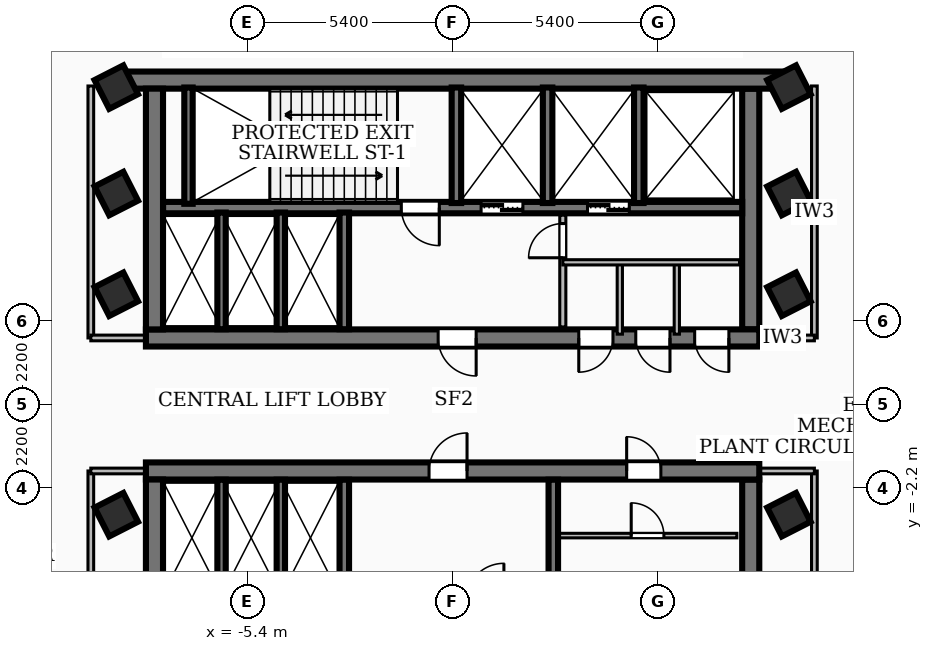
"""IFC4 building model, lengths in metres.
Left out: names, types, materials, properties, quantities, classifications, styles, units other than length and angle.
Written with IfcOpenShell. Run it as: python <this file> out.ifc"""

import sys

from ifc_helpers import new_model, si_unit, direction, frame, frame_2d, origin, origin_2d, place, context, subcontext, project, spatial, rectangle, extrude, element, fill, save


model = new_model("IFC4")
c1 = context("Model", 3, precision=1e-05, world=origin(), true_north=direction((0.0, 1.0)))
c2 = subcontext(c1, "Body", "Model", "MODEL_VIEW")
j1 = project(units=[si_unit("LENGTHUNIT", "METRE"), si_unit("PLANEANGLEUNIT", "RADIAN")], contexts=[c1])
p1 = place(None, origin())
s1 = spatial("IfcSite", under=j1, at=p1, CompositionType="ELEMENT")
p2 = place(p1, origin())
s2 = spatial("IfcBuilding", under=s1, at=p2, CompositionType="ELEMENT")
p3 = place(p2, frame((0.0, 0.0, 196.2)))
s3 = spatial("IfcBuildingStorey", under=s2, at=p3, CompositionType="ELEMENT", Elevation=196.2)
p4 = place(p3, frame((-8.78, 8.535, 0.0), z_axis=(0.0, 0.0, 1.0), x_axis=(1.0, 0.0, 0.0)))
e1 = element("IfcWall", 1, at=p4, inside=s3, PredefinedType="SHEAR", context=c2, shape_type="SweptSolid", body=[
    extrude(rectangle(XDim=17.56, YDim=0.45, at=frame_2d((8.78, 0.0))), origin(), (0.0, 0.0, 1.0), 4.42),
])
p5 = place(p3, frame((8.07, 1.75, 0.0), z_axis=(0.0, 0.0, 1.0), x_axis=(-1.0, 0.0, 0.0)))
e2 = element("IfcWall", 2, at=p5, inside=s3, PredefinedType="SHEAR", context=c2, shape_type="SweptSolid", body=[
    extrude(rectangle(XDim=16.14, YDim=0.45, at=frame_2d((8.07, 0.0))), origin(), (0.0, 0.0, 1.0), 4.42),
])
p6 = place(p5, frame((7.45, 0.0, 0.0)))
e3 = element("IfcOpeningElement", 3, at=p6, cuts=e2, PredefinedType="OPENING", context=c2, shape_type="SweptSolid", body=[
    extrude(rectangle(XDim=1.0, YDim=2.1, at=frame_2d((0.5, 1.05))), frame((0.0, 0.235, 0.0), z_axis=(0.0, -1.0, 0.0), x_axis=(1.0, 0.0, 0.0)), (0.0, 0.0, 1.0), 0.47),
])
p7 = place(p5, frame((3.85, 0.0, 0.0)))
e4 = element("IfcOpeningElement", 4, at=p7, cuts=e2, PredefinedType="OPENING", context=c2, shape_type="SweptSolid", body=[
    extrude(rectangle(XDim=0.9, YDim=2.06, at=frame_2d((0.45, 1.03))), frame((0.0, 0.235, 0.0), z_axis=(0.0, -1.0, 0.0), x_axis=(1.0, 0.0, 0.0)), (0.0, 0.0, 1.0), 0.47),
])
p8 = place(p5, frame((2.35, 0.0, 0.0)))
e5 = element("IfcOpeningElement", 5, at=p8, cuts=e2, PredefinedType="OPENING", context=c2, shape_type="SweptSolid", body=[
    extrude(rectangle(XDim=0.9, YDim=2.06, at=frame_2d((0.45, 1.03))), frame((0.0, 0.235, 0.0), z_axis=(0.0, -1.0, 0.0), x_axis=(1.0, 0.0, 0.0)), (0.0, 0.0, 1.0), 0.47),
])
p9 = place(p5, frame((0.8, 0.0, 0.0)))
e6 = element("IfcOpeningElement", 6, at=p9, cuts=e2, PredefinedType="OPENING", context=c2, shape_type="SweptSolid", body=[
    extrude(rectangle(XDim=0.9, YDim=2.06, at=frame_2d((0.45, 1.03))), frame((0.0, 0.235, 0.0), z_axis=(0.0, -1.0, 0.0), x_axis=(1.0, 0.0, 0.0)), (0.0, 0.0, 1.0), 0.47),
])
for number, where, z_axis, x_axis in (
    (7, (-7.845, 1.975, 0.0), (0.0, 0.0, 1.0), (0.0, 1.0, 0.0)),
    (8, (7.845, 8.31, 0.0), (0.0, 0.0, 1.0), (0.0, -1.0, 0.0)),
):
    element("IfcWall", number, at=place(p3, frame(where, z_axis=z_axis, x_axis=x_axis)), inside=s3, PredefinedType="SHEAR", context=c2, shape_type="SweptSolid", body=[
        extrude(rectangle(XDim=6.335, YDim=0.45, at=frame_2d((3.167, 0.0))), origin(), (0.0, 0.0, 1.0), 4.42),
    ])
p10 = place(p3, frame((7.62, 5.18, 0.0), z_axis=(0.0, 0.0, 1.0), x_axis=(-1.0, 0.0, 0.0)))
e9 = element("IfcWall", 9, at=p10, inside=s3, PredefinedType="SOLIDWALL", context=c2, shape_type="SweptSolid", body=[
    extrude(rectangle(XDim=15.24, YDim=0.3, at=frame_2d((7.62, 0.0))), origin(), (0.0, 0.0, 1.0), 4.42),
])
p11 = place(p10, frame((5.77, 0.0, 0.0)))
e10 = element("IfcOpeningElement", 10, at=p11, cuts=e9, PredefinedType="OPENING", context=c2, shape_type="SweptSolid", body=[
    extrude(rectangle(XDim=1.1, YDim=2.15, at=frame_2d((0.55, 1.075))), frame((0.0, 0.16, 0.0), z_axis=(0.0, -1.0, 0.0), x_axis=(1.0, 0.0, 0.0)), (0.0, 0.0, 1.0), 0.32),
])
p12 = place(p10, frame((2.97, 0.0, 0.0)))
e11 = element("IfcOpeningElement", 11, at=p12, cuts=e9, PredefinedType="OPENING", context=c2, shape_type="SweptSolid", body=[
    extrude(rectangle(XDim=1.1, YDim=2.15, at=frame_2d((0.55, 1.075))), frame((0.0, 0.16, 0.0), z_axis=(0.0, -1.0, 0.0), x_axis=(1.0, 0.0, 0.0)), (0.0, 0.0, 1.0), 0.32),
])
p13 = place(p10, frame((7.97, 0.0, 0.0)))
e12 = element("IfcOpeningElement", 12, at=p13, cuts=e9, PredefinedType="OPENING", context=c2, shape_type="SweptSolid", body=[
    extrude(rectangle(XDim=1.0, YDim=2.1, at=frame_2d((0.5, 1.05))), frame((0.0, 0.16, 0.0), z_axis=(0.0, -1.0, 0.0), x_axis=(1.0, 0.0, 0.0)), (0.0, 0.0, 1.0), 0.32),
])
p14 = place(p3, frame((-8.07, -1.75, 0.0), z_axis=(0.0, 0.0, 1.0), x_axis=(1.0, 0.0, 0.0)))
e13 = element("IfcWall", 13, at=p14, inside=s3, PredefinedType="SHEAR", context=c2, shape_type="SweptSolid", body=[
    extrude(rectangle(XDim=16.14, YDim=0.45, at=frame_2d((8.07, 0.0))), origin(), (0.0, 0.0, 1.0), 4.42),
])
p15 = place(p14, frame((7.45, 0.0, 0.0)))
e14 = element("IfcOpeningElement", 14, at=p15, cuts=e13, PredefinedType="OPENING", context=c2, shape_type="SweptSolid", body=[
    extrude(rectangle(XDim=1.0, YDim=2.1, at=frame_2d((0.5, 1.05))), frame((0.0, 0.235, 0.0), z_axis=(0.0, -1.0, 0.0), x_axis=(1.0, 0.0, 0.0)), (0.0, 0.0, 1.0), 0.47),
])
p16 = place(p14, frame((12.65, 0.0, 0.0)))
e15 = element("IfcOpeningElement", 15, at=p16, cuts=e13, PredefinedType="OPENING", context=c2, shape_type="SweptSolid", body=[
    extrude(rectangle(XDim=0.9, YDim=2.06, at=frame_2d((0.45, 1.03))), frame((0.0, 0.235, 0.0), z_axis=(0.0, -1.0, 0.0), x_axis=(1.0, 0.0, 0.0)), (0.0, 0.0, 1.0), 0.47),
])
for number, where, z_axis, x_axis in (
    (16, (-7.845, -8.31, 0.0), (0.0, 0.0, 1.0), (0.0, 1.0, 0.0)),
    (17, (7.845, -1.975, 0.0), (0.0, 0.0, 1.0), (0.0, -1.0, 0.0)),
):
    element("IfcWall", number, at=place(p3, frame(where, z_axis=z_axis, x_axis=x_axis)), inside=s3, PredefinedType="SHEAR", context=c2, shape_type="SweptSolid", body=[
        extrude(rectangle(XDim=6.335, YDim=0.45, at=frame_2d((3.167, 0.0))), origin(), (0.0, 0.0, 1.0), 4.42),
    ])
p17 = place(p3, frame((-6.95, 5.28, 0.0), z_axis=(0.0, 0.0, 1.0), x_axis=(0.0, 1.0, 0.0)))
e18 = element("IfcWall", 18, at=p17, inside=s3, PredefinedType="SOLIDWALL", context=c2, shape_type="SweptSolid", body=[
    extrude(rectangle(XDim=3.06, YDim=0.22, at=frame_2d((1.53, 0.0))), origin(), (0.0, 0.0, 1.0), 4.42),
])
for number, where, z_axis, x_axis in (
    (19, (0.1, 5.3, 0.0), (0.0, 0.0, 1.0), (0.0, 1.0, 0.0)),
    (20, (2.5, 5.3, 0.0), (0.0, 0.0, 1.0), (0.0, 1.0, 0.0)),
    (21, (4.9, 5.3, 0.0), (0.0, 0.0, 1.0), (0.0, 1.0, 0.0)),
):
    element("IfcWall", number, at=place(p3, frame(where, z_axis=z_axis, x_axis=x_axis)), inside=s3, PredefinedType="SOLIDWALL", context=c2, shape_type="SweptSolid", body=[
        extrude(rectangle(XDim=3.04, YDim=0.25, at=frame_2d((1.52, 0.0))), origin(), (0.0, 0.0, 1.0), 4.42),
    ])
for number, where, z_axis, x_axis in (
    (22, (-2.85, 1.98, 0.0), (0.0, 0.0, 1.0), (0.0, 1.0, 0.0)),
    (23, (-2.85, -5.05, 0.0), (0.0, 0.0, 1.0), (0.0, 1.0, 0.0)),
    (24, (2.65, -5.05, 0.0), (0.0, 0.0, 1.0), (0.0, 1.0, 0.0)),
):
    element("IfcWall", number, at=place(p3, frame(where, z_axis=z_axis, x_axis=x_axis)), inside=s3, PredefinedType="SOLIDWALL", context=c2, shape_type="SweptSolid", body=[
        extrude(rectangle(XDim=3.07, YDim=0.25, at=frame_2d((1.535, 0.0))), origin(), (0.0, 0.0, 1.0), 4.42),
    ])
for number, where, z_axis, x_axis in (
    (25, (-6.08, 1.98, 0.0), (0.0, 0.0, 1.0), (0.0, 1.0, 0.0)),
    (26, (-4.52, 1.98, 0.0), (0.0, 0.0, 1.0), (0.0, 1.0, 0.0)),
    (27, (-6.08, -5.05, 0.0), (0.0, 0.0, 1.0), (0.0, 1.0, 0.0)),
    (28, (-4.52, -5.05, 0.0), (0.0, 0.0, 1.0), (0.0, 1.0, 0.0)),
):
    element("IfcWall", number, at=place(p3, frame(where, z_axis=z_axis, x_axis=x_axis)), inside=s3, PredefinedType="SOLIDWALL", context=c2, shape_type="SweptSolid", body=[
        extrude(rectangle(XDim=3.07, YDim=0.22, at=frame_2d((1.535, 0.0))), origin(), (0.0, 0.0, 1.0), 4.42),
    ])
for number, where, z_axis, x_axis in (
    (29, (-8.85, -2.9, 0.0), (0.0, 0.0, 1.0), (0.891, 0.454, 0.0)),
    (30, (-8.85, 2.9, 0.0), (0.0, 0.0, 1.0), (0.891, 0.454, 0.0)),
    (31, (-8.85, 5.55, 0.0), (0.0, 0.0, 1.0), (0.891, 0.454, 0.0)),
    (32, (8.85, -2.9, 0.0), (0.0, 0.0, 1.0), (0.891, 0.454, 0.0)),
    (33, (8.85, 2.9, 0.0), (0.0, 0.0, 1.0), (0.891, 0.454, 0.0)),
    (34, (8.85, 5.55, 0.0), (0.0, 0.0, 1.0), (0.891, 0.454, 0.0)),
    (35, (-8.85, 8.35, 0.0), (0.0, 0.0, 1.0), (0.891, 0.454, 0.0)),
    (36, (8.85, 8.35, 0.0), (0.0, 0.0, 1.0), (0.891, 0.454, 0.0)),
):
    element("IfcColumn", number, at=place(p3, frame(where, z_axis=z_axis, x_axis=x_axis)), inside=s3, PredefinedType="COLUMN", context=c2, shape_type="SweptSolid", body=[
        extrude(rectangle(XDim=0.85, YDim=0.85, at=origin_2d()), origin(), (0.0, 0.0, 1.0), 4.68),
    ])
p18 = place(p3, frame((2.9, 2.04, 0.0), z_axis=(0.0, 0.0, 1.0), x_axis=(0.0, 1.0, 0.0)))
e37 = element("IfcWall", 37, at=p18, inside=s3, PredefinedType="PARTITIONING", context=c2, shape_type="SweptSolid", body=[
    extrude(rectangle(XDim=2.94, YDim=0.16, at=frame_2d((1.47, 0.0))), origin(), (0.0, 0.0, 1.0), 3.65),
])
p19 = place(p18, frame((1.82, 0.0, 0.0)))
e38 = element("IfcOpeningElement", 38, at=p19, cuts=e37, PredefinedType="OPENING", context=c2, shape_type="SweptSolid", body=[
    extrude(rectangle(XDim=0.9, YDim=2.06, at=frame_2d((0.45, 1.03))), frame((0.0, 0.09, 0.0), z_axis=(0.0, -1.0, 0.0), x_axis=(1.0, 0.0, 0.0)), (0.0, 0.0, 1.0), 0.18),
])
p20 = place(p3, frame((2.9, 3.74, 0.0), z_axis=(0.0, 0.0, 1.0), x_axis=(1.0, 0.0, 0.0)))
e39 = element("IfcWall", 39, at=p20, inside=s3, PredefinedType="PARTITIONING", context=c2, shape_type="SweptSolid", body=[
    extrude(rectangle(XDim=4.65, YDim=0.138, at=frame_2d((2.325, 0.0))), origin(), (0.0, 0.0, 1.0), 4.42),
])
p21 = place(p3, frame((2.8, -3.45, 0.0), z_axis=(0.0, 0.0, 1.0), x_axis=(1.0, 0.0, 0.0)))
e40 = element("IfcWall", 40, at=p21, inside=s3, PredefinedType="PARTITIONING", context=c2, shape_type="SweptSolid", body=[
    extrude(rectangle(XDim=4.68, YDim=0.12, at=frame_2d((2.34, 0.0))), origin(), (0.0, 0.0, 1.0), 4.42),
])
p22 = place(p21, frame((1.9, 0.0, 0.0)))
e41 = element("IfcOpeningElement", 41, at=p22, cuts=e40, PredefinedType="OPENING", context=c2, shape_type="SweptSolid", body=[
    extrude(rectangle(XDim=0.86, YDim=2.04, at=frame_2d((0.43, 1.02))), frame((0.0, 0.07, 0.0), z_axis=(0.0, -1.0, 0.0), x_axis=(1.0, 0.0, 0.0)), (0.0, 0.0, 1.0), 0.14),
])
for number, where, z_axis, x_axis in (
    (42, (4.4, 1.85, 0.0), (0.0, 0.0, 1.0), (0.0, 1.0, 0.0)),
    (43, (5.9, 1.85, 0.0), (0.0, 0.0, 1.0), (0.0, 1.0, 0.0)),
):
    element("IfcWall", number, at=place(p3, frame(where, z_axis=z_axis, x_axis=x_axis)), inside=s3, PredefinedType="PARTITIONING", context=c2, shape_type="SweptSolid", body=[
        extrude(rectangle(XDim=1.89, YDim=0.138, at=frame_2d((0.945, 0.0))), origin(), (0.0, 0.0, 1.0), 3.65),
    ])
p23 = place(p3, frame((-9.52, 1.75, 0.0), z_axis=(0.0, 0.0, 1.0), x_axis=(0.0, 1.0, 0.0)))
e44 = element("IfcWall", 44, at=p23, inside=s3, PredefinedType="PARTITIONING", context=c2, shape_type="SweptSolid", body=[
    extrude(rectangle(XDim=6.63, YDim=0.15, at=frame_2d((3.315, 0.0))), origin(), (0.0, 0.0, 1.0), 4.42),
])
p24 = place(p3, frame((-7.85, 1.75, 0.0), z_axis=(0.0, 0.0, 1.0), x_axis=(-1.0, 0.0, 0.0)))
e45 = element("IfcWall", 45, at=p24, inside=s3, PredefinedType="PARTITIONING", context=c2, shape_type="SweptSolid", body=[
    extrude(rectangle(XDim=1.67, YDim=0.15, at=frame_2d((0.835, 0.0))), origin(), (0.0, 0.0, 1.0), 3.65),
])
p25 = place(p3, frame((-9.52, -8.38, 0.0), z_axis=(0.0, 0.0, 1.0), x_axis=(0.0, 1.0, 0.0)))
e46 = element("IfcWall", 46, at=p25, inside=s3, PredefinedType="PARTITIONING", context=c2, shape_type="SweptSolid", body=[
    extrude(rectangle(XDim=6.63, YDim=0.15, at=frame_2d((3.315, 0.0))), origin(), (0.0, 0.0, 1.0), 2.212),
])
p26 = place(p3, frame((-7.85, -1.75, 0.0), z_axis=(0.0, 0.0, 1.0), x_axis=(-1.0, 0.0, 0.0)))
e47 = element("IfcWall", 47, at=p26, inside=s3, PredefinedType="PARTITIONING", context=c2, shape_type="SweptSolid", body=[
    extrude(rectangle(XDim=1.67, YDim=0.15, at=frame_2d((0.835, 0.0))), origin(), (0.0, 0.0, 1.0), 3.65),
])
p27 = place(p3, frame((9.52, 1.75, 0.0), z_axis=(0.0, 0.0, 1.0), x_axis=(0.0, 1.0, 0.0)))
e48 = element("IfcWall", 48, at=p27, inside=s3, PredefinedType="PARTITIONING", context=c2, shape_type="SweptSolid", body=[
    extrude(rectangle(XDim=6.63, YDim=0.15, at=frame_2d((3.315, 0.0))), origin(), (0.0, 0.0, 1.0), 2.212),
])
p28 = place(p3, frame((7.85, 1.75, 0.0), z_axis=(0.0, 0.0, 1.0), x_axis=(1.0, 0.0, 0.0)))
e49 = element("IfcWall", 49, at=p28, inside=s3, PredefinedType="PARTITIONING", context=c2, shape_type="SweptSolid", body=[
    extrude(rectangle(XDim=1.67, YDim=0.15, at=frame_2d((0.835, 0.0))), origin(), (0.0, 0.0, 1.0), 3.65),
])
p29 = place(p3, frame((9.52, -8.38, 0.0), z_axis=(0.0, 0.0, 1.0), x_axis=(0.0, 1.0, 0.0)))
e50 = element("IfcWall", 50, at=p29, inside=s3, PredefinedType="PARTITIONING", context=c2, shape_type="SweptSolid", body=[
    extrude(rectangle(XDim=6.63, YDim=0.15, at=frame_2d((3.315, 0.0))), origin(), (0.0, 0.0, 1.0), 4.42),
])
p30 = place(p3, frame((7.85, -1.75, 0.0), z_axis=(0.0, 0.0, 1.0), x_axis=(1.0, 0.0, 0.0)))
e51 = element("IfcWall", 51, at=p30, inside=s3, PredefinedType="PARTITIONING", context=c2, shape_type="SweptSolid", body=[
    extrude(rectangle(XDim=1.67, YDim=0.15, at=frame_2d((0.835, 0.0))), origin(), (0.0, 0.0, 1.0), 3.65),
])
p31 = place(p3, frame((7.943, 15.887, 0.0), z_axis=(0.0, 0.0, 1.0), x_axis=(0.454027476073, -0.890987682839, 0.0)))
e52 = element("IfcWall", 52, at=p31, inside=s3, PredefinedType="PARTITIONING", context=c2, shape_type="SweptSolid", body=[
    extrude(rectangle(XDim=20.499, YDim=0.15, at=frame_2d((10.249, 0.0))), origin(), (0.0, 0.0, 1.0), 2.212),
])
p32 = place(p31, frame((10.0, 0.0, 0.0)))
e53 = element("IfcOpeningElement", 53, at=p32, cuts=e52, PredefinedType="OPENING", context=c2, shape_type="SweptSolid", body=[
    extrude(rectangle(XDim=1.1, YDim=2.15, at=frame_2d((0.55, 1.075))), frame((0.0, 0.085, 0.0), z_axis=(0.0, -1.0, 0.0), x_axis=(1.0, 0.0, 0.0)), (0.0, 0.0, 1.0), 0.17),
])
p33 = place(p3, frame((-15.887, 7.943, 0.0), z_axis=(0.0, 0.0, 1.0), x_axis=(0.890987682839, 0.454027476073, 0.0)))
e54 = element("IfcWall", 54, at=p33, inside=s3, PredefinedType="PARTITIONING", context=c2, shape_type="SweptSolid", body=[
    extrude(rectangle(XDim=20.499, YDim=0.15, at=frame_2d((10.249, 0.0))), origin(), (0.0, 0.0, 1.0), 2.212),
])
p34 = place(p33, frame((10.0, 0.0, 0.0)))
e55 = element("IfcOpeningElement", 55, at=p34, cuts=e54, PredefinedType="OPENING", context=c2, shape_type="SweptSolid", body=[
    extrude(rectangle(XDim=1.1, YDim=2.15, at=frame_2d((0.55, 1.075))), frame((0.0, 0.085, 0.0), z_axis=(0.0, -1.0, 0.0), x_axis=(1.0, 0.0, 0.0)), (0.0, 0.0, 1.0), 0.17),
])
p35 = place(p3, frame((-7.943, -15.887, 0.0), z_axis=(0.0, 0.0, 1.0), x_axis=(-0.454027476073, 0.890987682839, 0.0)))
e56 = element("IfcWall", 56, at=p35, inside=s3, PredefinedType="PARTITIONING", context=c2, shape_type="SweptSolid", body=[
    extrude(rectangle(XDim=20.499, YDim=0.15, at=frame_2d((10.249, 0.0))), origin(), (0.0, 0.0, 1.0), 2.212),
])
p36 = place(p35, frame((10.0, 0.0, 0.0)))
e57 = element("IfcOpeningElement", 57, at=p36, cuts=e56, PredefinedType="OPENING", context=c2, shape_type="SweptSolid", body=[
    extrude(rectangle(XDim=1.1, YDim=2.15, at=frame_2d((0.55, 1.075))), frame((0.0, 0.085, 0.0), z_axis=(0.0, -1.0, 0.0), x_axis=(1.0, 0.0, 0.0)), (0.0, 0.0, 1.0), 0.17),
])
p37 = place(p6, origin())
e58 = element("IfcDoor", 58, at=p37, inside=s3, OperationType="SINGLE_SWING_LEFT", PredefinedType="DOOR", context=c2, shape_type="SweptSolid", body=[
    extrude(rectangle(XDim=1.0, YDim=2.1, at=frame_2d((0.5, 1.05))), frame((0.0, 0.025, 0.0), z_axis=(0.0, -1.0, 0.0), x_axis=(1.0, 0.0, 0.0)), (0.0, 0.0, 1.0), 0.05),
])
fill(e3, e58)
p38 = place(p15, origin())
e59 = element("IfcDoor", 59, at=p38, inside=s3, OperationType="SINGLE_SWING_RIGHT", PredefinedType="DOOR", context=c2, shape_type="SweptSolid", body=[
    extrude(rectangle(XDim=1.0, YDim=2.1, at=frame_2d((0.5, 1.05))), frame((0.0, 0.025, 0.0), z_axis=(0.0, -1.0, 0.0), x_axis=(1.0, 0.0, 0.0)), (0.0, 0.0, 1.0), 0.05),
])
fill(e14, e59)
p39 = place(p11, origin())
e60 = element("IfcDoor", 60, at=p39, inside=s3, OperationType="DOUBLE_DOOR_SLIDING", PredefinedType="DOOR", context=c2, shape_type="SweptSolid", body=[
    extrude(rectangle(XDim=1.1, YDim=2.15, at=frame_2d((0.55, 1.075))), frame((0.0, 0.025, 0.0), z_axis=(0.0, -1.0, 0.0), x_axis=(1.0, 0.0, 0.0)), (0.0, 0.0, 1.0), 0.05),
])
fill(e10, e60)
p40 = place(p12, origin())
e61 = element("IfcDoor", 61, at=p40, inside=s3, OperationType="DOUBLE_DOOR_SLIDING", PredefinedType="DOOR", context=c2, shape_type="SweptSolid", body=[
    extrude(rectangle(XDim=1.1, YDim=2.15, at=frame_2d((0.55, 1.075))), frame((0.0, 0.025, 0.0), z_axis=(0.0, -1.0, 0.0), x_axis=(1.0, 0.0, 0.0)), (0.0, 0.0, 1.0), 0.05),
])
fill(e11, e61)
p41 = place(p13, origin())
e62 = element("IfcDoor", 62, at=p41, inside=s3, OperationType="SINGLE_SWING_LEFT", PredefinedType="DOOR", context=c2, shape_type="SweptSolid", body=[
    extrude(rectangle(XDim=1.0, YDim=2.1, at=frame_2d((0.5, 1.05))), frame((0.0, 0.025, 0.0), z_axis=(0.0, -1.0, 0.0), x_axis=(1.0, 0.0, 0.0)), (0.0, 0.0, 1.0), 0.05),
])
fill(e12, e62)
p42 = place(p16, origin())
e63 = element("IfcDoor", 63, at=p42, inside=s3, OperationType="SINGLE_SWING_LEFT", PredefinedType="DOOR", context=c2, shape_type="SweptSolid", body=[
    extrude(rectangle(XDim=0.9, YDim=2.06, at=frame_2d((0.45, 1.03))), frame((0.0, 0.025, 0.0), z_axis=(0.0, -1.0, 0.0), x_axis=(1.0, 0.0, 0.0)), (0.0, 0.0, 1.0), 0.05),
])
fill(e15, e63)
p43 = place(p7, origin())
e64 = element("IfcDoor", 64, at=p43, inside=s3, OperationType="SINGLE_SWING_RIGHT", PredefinedType="DOOR", context=c2, shape_type="SweptSolid", body=[
    extrude(rectangle(XDim=0.9, YDim=2.06, at=frame_2d((0.45, 1.03))), frame((0.0, 0.025, 0.0), z_axis=(0.0, -1.0, 0.0), x_axis=(1.0, 0.0, 0.0)), (0.0, 0.0, 1.0), 0.05),
])
fill(e4, e64)
p44 = place(p8, origin())
e65 = element("IfcDoor", 65, at=p44, inside=s3, OperationType="SINGLE_SWING_LEFT", PredefinedType="DOOR", context=c2, shape_type="SweptSolid", body=[
    extrude(rectangle(XDim=0.9, YDim=2.06, at=frame_2d((0.45, 1.03))), frame((0.0, 0.025, 0.0), z_axis=(0.0, -1.0, 0.0), x_axis=(1.0, 0.0, 0.0)), (0.0, 0.0, 1.0), 0.05),
])
fill(e5, e65)
p45 = place(p9, origin())
e66 = element("IfcDoor", 66, at=p45, inside=s3, OperationType="SINGLE_SWING_LEFT", PredefinedType="DOOR", context=c2, shape_type="SweptSolid", body=[
    extrude(rectangle(XDim=0.9, YDim=2.06, at=frame_2d((0.45, 1.03))), frame((0.0, 0.025, 0.0), z_axis=(0.0, -1.0, 0.0), x_axis=(1.0, 0.0, 0.0)), (0.0, 0.0, 1.0), 0.05),
])
fill(e6, e66)
p46 = place(p19, origin())
e67 = element("IfcDoor", 67, at=p46, inside=s3, OperationType="SINGLE_SWING_LEFT", PredefinedType="DOOR", context=c2, shape_type="SweptSolid", body=[
    extrude(rectangle(XDim=0.9, YDim=2.06, at=frame_2d((0.45, 1.03))), frame((0.0, 0.025, 0.0), z_axis=(0.0, -1.0, 0.0), x_axis=(1.0, 0.0, 0.0)), (0.0, 0.0, 1.0), 0.05),
])
fill(e38, e67)
p47 = place(p22, origin())
e68 = element("IfcDoor", 68, at=p47, inside=s3, OperationType="SINGLE_SWING_LEFT", PredefinedType="DOOR", context=c2, shape_type="SweptSolid", body=[
    extrude(rectangle(XDim=0.86, YDim=2.04, at=frame_2d((0.43, 1.02))), frame((0.0, 0.025, 0.0), z_axis=(0.0, -1.0, 0.0), x_axis=(1.0, 0.0, 0.0)), (0.0, 0.0, 1.0), 0.05),
])
fill(e41, e68)
save(model, sys.argv[1])
